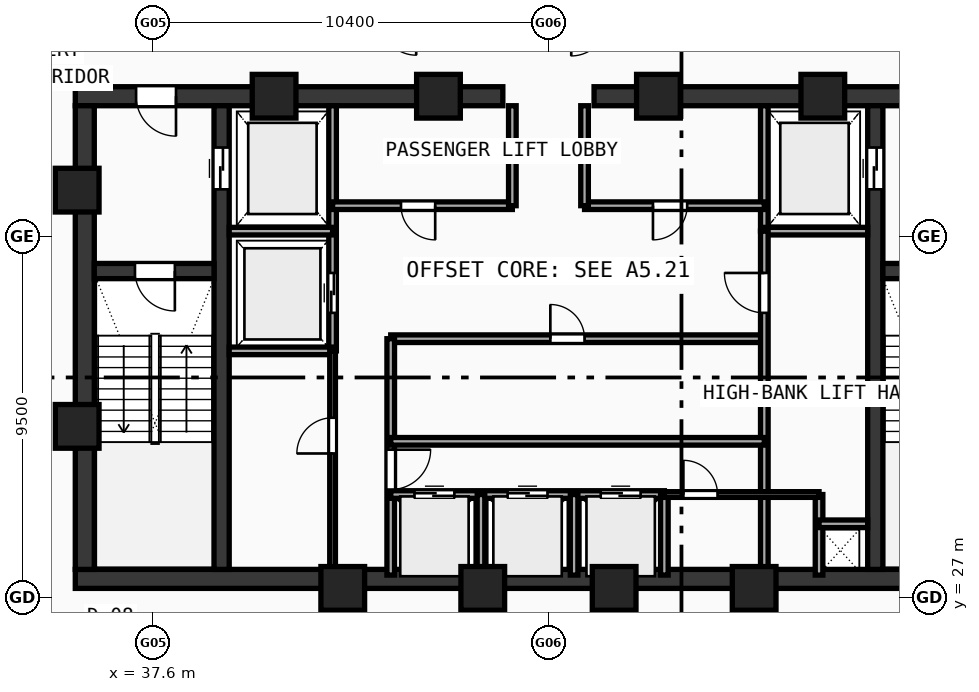
"""IFC4 building model, lengths in metres.
Left out: names, types, materials, properties, quantities, classifications, styles, units other than length and angle.
Written with IfcOpenShell. Run it as: python <this file> out.ifc"""

import sys

from ifc_helpers import new_model, si_unit, direction, frame, frame_2d, origin, origin_with_axes, origin_2d, place, context, subcontext, project, spatial, rectangle, hollow_rectangle, extrude, source, transform, mapped, element, fill, save


model = new_model("IFC4")
c1 = context("Model", 3, precision=1e-05, world=origin(), true_north=direction((0.0, 1.0)))
c2 = subcontext(c1, "Body", "Model", "MODEL_VIEW")
j1 = project(units=[si_unit("LENGTHUNIT", "METRE"), si_unit("PLANEANGLEUNIT", "RADIAN")], contexts=[c1])
p1 = place(None, origin())
s1 = spatial("IfcSite", under=j1, at=p1, CompositionType="ELEMENT")
p2 = place(p1, origin())
s2 = spatial("IfcBuilding", under=s1, at=p2, CompositionType="ELEMENT")
p3 = place(p2, frame((0.0, 0.0, 348.01)))
s3 = spatial("IfcBuildingStorey", under=s2, at=p3, CompositionType="ELEMENT", Elevation=348.01)
p4 = place(p3, frame((35.55, 27.5, 0.0), z_axis=(0.0, 0.0, 1.0), x_axis=(1.0, 0.0, 0.0)))
e1 = element("IfcWall", 1, at=p4, inside=s3, PredefinedType="SHEAR", context=c2, shape_type="SweptSolid", body=[
    extrude(rectangle(XDim=24.9, YDim=0.5, at=frame_2d((12.45, 0.0))), origin(), (0.0, 0.0, 1.0), 3.49),
])
p5 = place(p3, frame((35.55, 40.2, 0.0), z_axis=(0.0, 0.0, 1.0), x_axis=(1.0, 0.0, 0.0)))
e2 = element("IfcWall", 2, at=p5, inside=s3, PredefinedType="SHEAR", context=c2, shape_type="SweptSolid", body=[
    extrude(rectangle(XDim=11.25, YDim=0.5, at=frame_2d((5.625, 0.0))), origin(), (0.0, 0.0, 1.0), 3.49),
])
p6 = place(p5, frame((1.6, 0.0, 0.0)))
e3 = element("IfcOpeningElement", 3, at=p6, cuts=e2, PredefinedType="OPENING", context=c2, shape_type="SweptSolid", body=[
    extrude(rectangle(XDim=1.05, YDim=2.1, at=frame_2d((0.525, 1.05))), frame((0.0, 0.26, 0.0), z_axis=(0.0, -1.0, 0.0), x_axis=(1.0, 0.0, 0.0)), (0.0, 0.0, 1.0), 0.52),
])
p7 = place(p3, frame((49.2, 40.2, 0.0), z_axis=(0.0, 0.0, 1.0), x_axis=(1.0, 0.0, 0.0)))
e4 = element("IfcWall", 4, at=p7, inside=s3, PredefinedType="SHEAR", context=c2, shape_type="SweptSolid", body=[
    extrude(rectangle(XDim=11.25, YDim=0.5, at=frame_2d((5.625, 0.0))), origin(), (0.0, 0.0, 1.0), 3.49),
])
p8 = place(p7, frame((8.6, 0.0, 0.0)))
e5 = element("IfcOpeningElement", 5, at=p8, cuts=e4, PredefinedType="OPENING", context=c2, shape_type="SweptSolid", body=[
    extrude(rectangle(XDim=1.05, YDim=2.1, at=frame_2d((0.525, 1.05))), frame((0.0, 0.26, 0.0), z_axis=(0.0, -1.0, 0.0), x_axis=(1.0, 0.0, 0.0)), (0.0, 0.0, 1.0), 0.52),
])
p9 = place(p3, frame((35.8, 27.75, 0.0), z_axis=(0.0, 0.0, 1.0), x_axis=(0.0, 1.0, 0.0)))
e6 = element("IfcWall", 6, at=p9, inside=s3, PredefinedType="SHEAR", context=c2, shape_type="SweptSolid", body=[
    extrude(rectangle(XDim=12.2, YDim=0.5, at=frame_2d((6.1, 0.0))), origin(), (0.0, 0.0, 1.0), 3.49),
])
p10 = place(p3, frame((39.4, 27.75, 0.0), z_axis=(0.0, 0.0, 1.0), x_axis=(0.0, 1.0, 0.0)))
e7 = element("IfcWall", 7, at=p10, inside=s3, PredefinedType="SHEAR", context=c2, shape_type="SweptSolid", body=[
    extrude(rectangle(XDim=12.2, YDim=0.4, at=frame_2d((6.1, 0.0))), origin(), (0.0, 0.0, 1.0), 3.49),
])
p11 = place(p10, frame((10.0, 0.0, 0.0)))
e8 = element("IfcOpeningElement", 8, at=p11, cuts=e7, PredefinedType="OPENING", context=c2, shape_type="SweptSolid", body=[
    extrude(rectangle(XDim=1.1, YDim=2.1, at=frame_2d((0.55, 1.05))), frame((0.0, 0.21, 0.0), z_axis=(0.0, -1.0, 0.0), x_axis=(1.0, 0.0, 0.0)), (0.0, 0.0, 1.0), 0.42),
])
p12 = place(p3, frame((56.6, 27.75, 0.0), z_axis=(0.0, 0.0, 1.0), x_axis=(0.0, 1.0, 0.0)))
e9 = element("IfcWall", 9, at=p12, inside=s3, PredefinedType="SHEAR", context=c2, shape_type="SweptSolid", body=[
    extrude(rectangle(XDim=12.2, YDim=0.4, at=frame_2d((6.1, 0.0))), origin(), (0.0, 0.0, 1.0), 3.49),
])
p13 = place(p12, frame((10.0, 0.0, 0.0)))
e10 = element("IfcOpeningElement", 10, at=p13, cuts=e9, PredefinedType="OPENING", context=c2, shape_type="SweptSolid", body=[
    extrude(rectangle(XDim=1.1, YDim=2.1, at=frame_2d((0.55, 1.05))), frame((0.0, 0.21, 0.0), z_axis=(0.0, -1.0, 0.0), x_axis=(1.0, 0.0, 0.0)), (0.0, 0.0, 1.0), 0.42),
])
p14 = place(p3, frame((36.05, 35.6, 0.0), z_axis=(0.0, 0.0, 1.0), x_axis=(1.0, 0.0, 0.0)))
e11 = element("IfcWall", 11, at=p14, inside=s3, PredefinedType="SHEAR", context=c2, shape_type="SweptSolid", body=[
    extrude(rectangle(XDim=3.15, YDim=0.4, at=frame_2d((1.575, 0.0))), origin(), (0.0, 0.0, 1.0), 3.49),
])
p15 = place(p14, frame((1.07, 0.0, 0.0)))
e12 = element("IfcOpeningElement", 12, at=p15, cuts=e11, PredefinedType="OPENING", context=c2, shape_type="SweptSolid", body=[
    extrude(rectangle(XDim=1.05, YDim=2.1, at=frame_2d((0.525, 1.05))), frame((0.0, 0.21, 0.0), z_axis=(0.0, -1.0, 0.0), x_axis=(1.0, 0.0, 0.0)), (0.0, 0.0, 1.0), 0.42),
])
p16 = place(p3, frame((56.8, 35.6, 0.0), z_axis=(0.0, 0.0, 1.0), x_axis=(1.0, 0.0, 0.0)))
e13 = element("IfcWall", 13, at=p16, inside=s3, PredefinedType="SHEAR", context=c2, shape_type="SweptSolid", body=[
    extrude(rectangle(XDim=3.15, YDim=0.4, at=frame_2d((1.575, 0.0))), origin(), (0.0, 0.0, 1.0), 3.49),
])
p17 = place(p16, frame((1.02, 0.0, 0.0)))
e14 = element("IfcOpeningElement", 14, at=p17, cuts=e13, PredefinedType="OPENING", context=c2, shape_type="SweptSolid", body=[
    extrude(rectangle(XDim=1.05, YDim=2.1, at=frame_2d((0.525, 1.05))), frame((0.0, 0.21, 0.0), z_axis=(0.0, -1.0, 0.0), x_axis=(1.0, 0.0, 0.0)), (0.0, 0.0, 1.0), 0.42),
])
m1 = source(origin(), c2, "Body", "SweptSolid", [
    extrude(hollow_rectangle(XDim=1.15, YDim=1.15, WallThickness=0.048, at=origin_2d()), origin(), (0.0, 0.0, 1.0), 3.75),
])
for number, where, z_axis, x_axis in (
    (15, (42.588, 27.25, -0.26), (0.0, 0.0, 1.0), (1.0, 0.0, 0.0)),
    (16, (46.272, 27.25, -0.26), (0.0, 0.0, 1.0), (1.0, 0.0, 0.0)),
    (17, (49.729, 27.25, -0.26), (0.0, 0.0, 1.0), (1.0, 0.0, 0.0)),
    (18, (53.412, 27.25, -0.26), (0.0, 0.0, 1.0), (1.0, 0.0, 0.0)),
    (19, (55.219, 40.2, -0.26), (0.0, 0.0, 1.0), (1.0, 0.0, 0.0)),
    (20, (50.894, 40.2, -0.26), (0.0, 0.0, 1.0), (1.0, 0.0, 0.0)),
    (21, (45.106, 40.2, -0.26), (0.0, 0.0, 1.0), (1.0, 0.0, 0.0)),
    (22, (40.781, 40.2, -0.26), (0.0, 0.0, 1.0), (1.0, 0.0, 0.0)),
    (23, (35.6, 37.729, -0.26), (0.0, 0.0, 1.0), (1.0, 0.0, 0.0)),
    (24, (35.6, 31.513, -0.26), (0.0, 0.0, 1.0), (1.0, 0.0, 0.0)),
):
    element("IfcColumn", number, at=place(p3, frame(where, z_axis=z_axis, x_axis=x_axis)), inside=s3, PredefinedType="COLUMN", context=c2, shape_type="MappedRepresentation", body=[
        mapped(m1, transform((0.0, 0.0, 0.0), scale=1.0)),
    ])
p18 = place(p3, frame((42.32, 33.5, 0.0), z_axis=(0.0, 0.0, 1.0), x_axis=(0.0, 1.0, 0.0)))
e25 = element("IfcWall", 25, at=p18, inside=s3, PredefinedType="SOLIDWALL", context=c2, shape_type="SweptSolid", body=[
    extrude(rectangle(XDim=6.45, YDim=0.2, at=frame_2d((3.225, 0.0))), origin(), (0.0, 0.0, 1.0), 3.49),
])
p19 = place(p18, frame((1.0, 0.0, 0.0)))
e26 = element("IfcOpeningElement", 26, at=p19, cuts=e25, PredefinedType="OPENING", context=c2, shape_type="SweptSolid", body=[
    extrude(rectangle(XDim=1.05, YDim=2.1, at=frame_2d((0.525, 1.05))), frame((0.0, 0.11, 0.0), z_axis=(0.0, -1.0, 0.0), x_axis=(1.0, 0.0, 0.0)), (0.0, 0.0, 1.0), 0.22),
])
for number, where, z_axis, x_axis in (
    (27, (39.6, 36.65, 0.0), (0.0, 0.0, 1.0), (1.0, 0.0, 0.0)),
    (28, (39.6, 33.5, 0.0), (0.0, 0.0, 1.0), (1.0, 0.0, 0.0)),
):
    element("IfcWall", number, at=place(p3, frame(where, z_axis=z_axis, x_axis=x_axis)), inside=s3, PredefinedType="SOLIDWALL", context=c2, shape_type="SweptSolid", body=[
        extrude(rectangle(XDim=2.72, YDim=0.2, at=frame_2d((1.36, 0.0))), origin(), (0.0, 0.0, 1.0), 3.49),
    ])
p20 = place(p3, frame((53.68, 36.65, 0.0), z_axis=(0.0, 0.0, 1.0), x_axis=(0.0, 1.0, 0.0)))
e29 = element("IfcWall", 29, at=p20, inside=s3, PredefinedType="SOLIDWALL", context=c2, shape_type="SweptSolid", body=[
    extrude(rectangle(XDim=3.3, YDim=0.2, at=frame_2d((1.65, 0.0))), origin(), (0.0, 0.0, 1.0), 3.49),
])
p21 = place(p3, frame((53.68, 36.65, 0.0), z_axis=(0.0, 0.0, 1.0), x_axis=(1.0, 0.0, 0.0)))
e30 = element("IfcWall", 30, at=p21, inside=s3, PredefinedType="SOLIDWALL", context=c2, shape_type="SweptSolid", body=[
    extrude(rectangle(XDim=2.72, YDim=0.2, at=frame_2d((1.36, 0.0))), origin(), (0.0, 0.0, 1.0), 3.49),
])
p22 = place(p3, frame((42.32, 37.32, 0.0), z_axis=(0.0, 0.0, 1.0), x_axis=(1.0, 0.0, 0.0)))
e31 = element("IfcWall", 31, at=p22, inside=s3, PredefinedType="SOLIDWALL", context=c2, shape_type="SweptSolid", body=[
    extrude(rectangle(XDim=4.73, YDim=0.2, at=frame_2d((2.365, 0.0))), origin(), (0.0, 0.0, 1.0), 3.49),
])
p23 = place(p22, frame((1.8, 0.0, 0.0)))
e32 = element("IfcOpeningElement", 32, at=p23, cuts=e31, PredefinedType="OPENING", context=c2, shape_type="SweptSolid", body=[
    extrude(rectangle(XDim=0.9, YDim=2.1, at=frame_2d((0.45, 1.05))), frame((0.0, 0.11, 0.0), z_axis=(0.0, -1.0, 0.0), x_axis=(1.0, 0.0, 0.0)), (0.0, 0.0, 1.0), 0.22),
])
p24 = place(p3, frame((48.95, 37.32, 0.0), z_axis=(0.0, 0.0, 1.0), x_axis=(1.0, 0.0, 0.0)))
e33 = element("IfcWall", 33, at=p24, inside=s3, PredefinedType="SOLIDWALL", context=c2, shape_type="SweptSolid", body=[
    extrude(rectangle(XDim=4.73, YDim=0.2, at=frame_2d((2.365, 0.0))), origin(), (0.0, 0.0, 1.0), 3.49),
])
p25 = place(p24, frame((1.8, 0.0, 0.0)))
e34 = element("IfcOpeningElement", 34, at=p25, cuts=e33, PredefinedType="OPENING", context=c2, shape_type="SweptSolid", body=[
    extrude(rectangle(XDim=0.9, YDim=2.1, at=frame_2d((0.45, 1.05))), frame((0.0, 0.11, 0.0), z_axis=(0.0, -1.0, 0.0), x_axis=(1.0, 0.0, 0.0)), (0.0, 0.0, 1.0), 0.22),
])
for number, where, z_axis, x_axis in (
    (35, (47.05, 37.32, 0.0), (0.0, 0.0, 1.0), (0.0, 1.0, 0.0)),
    (36, (48.95, 37.32, 0.0), (0.0, 0.0, 1.0), (0.0, 1.0, 0.0)),
):
    element("IfcWall", number, at=place(p3, frame(where, z_axis=z_axis, x_axis=x_axis)), inside=s3, PredefinedType="SOLIDWALL", context=c2, shape_type="SweptSolid", body=[
        extrude(rectangle(XDim=2.63, YDim=0.2, at=frame_2d((1.315, 0.0))), origin(), (0.0, 0.0, 1.0), 3.49),
    ])
p26 = place(p3, frame((43.85, 33.82, 0.0), z_axis=(0.0, 0.0, 1.0), x_axis=(1.0, 0.0, 0.0)))
e37 = element("IfcWall", 37, at=p26, inside=s3, PredefinedType="SOLIDWALL", context=c2, shape_type="SweptSolid", body=[
    extrude(rectangle(XDim=9.83, YDim=0.2, at=frame_2d((4.915, 0.0))), origin(), (0.0, 0.0, 1.0), 3.49),
])
p27 = place(p26, frame((4.2, 0.0, 0.0)))
e38 = element("IfcOpeningElement", 38, at=p27, cuts=e37, PredefinedType="OPENING", context=c2, shape_type="SweptSolid", body=[
    extrude(rectangle(XDim=0.9, YDim=2.1, at=frame_2d((0.45, 1.05))), frame((0.0, 0.11, 0.0), z_axis=(0.0, -1.0, 0.0), x_axis=(1.0, 0.0, 0.0)), (0.0, 0.0, 1.0), 0.22),
])
p28 = place(p3, frame((43.85, 27.6, 0.0), z_axis=(0.0, 0.0, 1.0), x_axis=(0.0, 1.0, 0.0)))
e39 = element("IfcWall", 39, at=p28, inside=s3, PredefinedType="SOLIDWALL", context=c2, shape_type="SweptSolid", body=[
    extrude(rectangle(XDim=6.22, YDim=0.2, at=frame_2d((3.11, 0.0))), origin(), (0.0, 0.0, 1.0), 3.49),
])
p29 = place(p28, frame((2.25, 0.0, 0.0)))
e40 = element("IfcOpeningElement", 40, at=p29, cuts=e39, PredefinedType="OPENING", context=c2, shape_type="SweptSolid", body=[
    extrude(rectangle(XDim=1.05, YDim=2.1, at=frame_2d((0.525, 1.05))), frame((0.0, 0.11, 0.0), z_axis=(0.0, -1.0, 0.0), x_axis=(1.0, 0.0, 0.0)), (0.0, 0.0, 1.0), 0.22),
])
p30 = place(p3, frame((53.68, 27.6, 0.0), z_axis=(0.0, 0.0, 1.0), x_axis=(0.0, 1.0, 0.0)))
e41 = element("IfcWall", 41, at=p30, inside=s3, PredefinedType="SOLIDWALL", context=c2, shape_type="SweptSolid", body=[
    extrude(rectangle(XDim=9.05, YDim=0.2, at=frame_2d((4.525, 0.0))), origin(), (0.0, 0.0, 1.0), 3.49),
])
p31 = place(p30, frame((6.9, 0.0, 0.0)))
e42 = element("IfcOpeningElement", 42, at=p31, cuts=e41, PredefinedType="OPENING", context=c2, shape_type="SweptSolid", body=[
    extrude(rectangle(XDim=1.05, YDim=2.1, at=frame_2d((0.525, 1.05))), frame((0.0, 0.11, 0.0), z_axis=(0.0, -1.0, 0.0), x_axis=(1.0, 0.0, 0.0)), (0.0, 0.0, 1.0), 0.22),
])
p32 = place(p3, frame((43.85, 29.72, 0.0), z_axis=(0.0, 0.0, 1.0), x_axis=(1.0, 0.0, 0.0)))
e43 = element("IfcWall", 43, at=p32, inside=s3, PredefinedType="SOLIDWALL", context=c2, shape_type="SweptSolid", body=[
    extrude(rectangle(XDim=7.2, YDim=0.2, at=frame_2d((3.6, 0.0))), origin(), (0.0, 0.0, 1.0), 3.49),
])
p33 = place(p32, frame((0.625, 0.0, 0.0)))
e44 = element("IfcOpeningElement", 44, at=p33, cuts=e43, PredefinedType="OPENING", context=c2, shape_type="SweptSolid", body=[
    extrude(rectangle(XDim=1.05, YDim=2.1, at=frame_2d((0.525, 1.05))), frame((0.0, 0.11, 0.0), z_axis=(0.0, -1.0, 0.0), x_axis=(1.0, 0.0, 0.0)), (0.0, 0.0, 1.0), 0.22),
])
p34 = place(p32, frame((3.075, 0.0, 0.0)))
e45 = element("IfcOpeningElement", 45, at=p34, cuts=e43, PredefinedType="OPENING", context=c2, shape_type="SweptSolid", body=[
    extrude(rectangle(XDim=1.05, YDim=2.1, at=frame_2d((0.525, 1.05))), frame((0.0, 0.11, 0.0), z_axis=(0.0, -1.0, 0.0), x_axis=(1.0, 0.0, 0.0)), (0.0, 0.0, 1.0), 0.22),
])
p35 = place(p32, frame((5.525, 0.0, 0.0)))
e46 = element("IfcOpeningElement", 46, at=p35, cuts=e43, PredefinedType="OPENING", context=c2, shape_type="SweptSolid", body=[
    extrude(rectangle(XDim=1.05, YDim=2.1, at=frame_2d((0.525, 1.05))), frame((0.0, 0.11, 0.0), z_axis=(0.0, -1.0, 0.0), x_axis=(1.0, 0.0, 0.0)), (0.0, 0.0, 1.0), 0.22),
])
p36 = place(p3, frame((51.05, 27.6, 0.0), z_axis=(0.0, 0.0, 1.0), x_axis=(0.0, 1.0, 0.0)))
e47 = element("IfcWall", 47, at=p36, inside=s3, PredefinedType="SOLIDWALL", context=c2, shape_type="SweptSolid", body=[
    extrude(rectangle(XDim=2.12, YDim=0.2, at=frame_2d((1.06, 0.0))), origin(), (0.0, 0.0, 1.0), 3.49),
])
p37 = place(p3, frame((43.85, 31.12, 0.0), z_axis=(0.0, 0.0, 1.0), x_axis=(1.0, 0.0, 0.0)))
e48 = element("IfcWall", 48, at=p37, inside=s3, PredefinedType="SOLIDWALL", context=c2, shape_type="SweptSolid", body=[
    extrude(rectangle(XDim=9.83, YDim=0.2, at=frame_2d((4.915, 0.0))), origin(), (0.0, 0.0, 1.0), 3.49),
])
for number, where, z_axis, x_axis in (
    (49, (46.225, 27.6, 0.0), (0.0, 0.0, 1.0), (0.0, 1.0, 0.0)),
    (50, (48.675, 27.6, 0.0), (0.0, 0.0, 1.0), (0.0, 1.0, 0.0)),
    (51, (55.12, 27.6, 0.0), (0.0, 0.0, 1.0), (0.0, 1.0, 0.0)),
):
    element("IfcWall", number, at=place(p3, frame(where, z_axis=z_axis, x_axis=x_axis)), inside=s3, PredefinedType="SOLIDWALL", context=c2, shape_type="SweptSolid", body=[
        extrude(rectangle(XDim=2.12, YDim=0.2, at=frame_2d((1.06, 0.0))), origin(), (0.0, 0.0, 1.0), 3.49),
    ])
p38 = place(p3, frame((55.12, 28.95, 0.0), z_axis=(0.0, 0.0, 1.0), x_axis=(1.0, 0.0, 0.0)))
e52 = element("IfcWall", 52, at=p38, inside=s3, PredefinedType="SOLIDWALL", context=c2, shape_type="SweptSolid", body=[
    extrude(rectangle(XDim=1.28, YDim=0.2, at=frame_2d((0.64, 0.0))), origin(), (0.0, 0.0, 1.0), 3.49),
])
p39 = place(p3, frame((42.32, 27.6, 0.0), z_axis=(0.0, 0.0, 1.0), x_axis=(0.0, 1.0, 0.0)))
e53 = element("IfcWall", 53, at=p39, inside=s3, PredefinedType="PARTITIONING", context=c2, shape_type="SweptSolid", body=[
    extrude(rectangle(XDim=5.9, YDim=0.15, at=frame_2d((2.95, 0.0))), origin(), (0.0, 0.0, 1.0), 3.49),
])
p40 = place(p39, frame((3.2, 0.0, 0.0)))
e54 = element("IfcOpeningElement", 54, at=p40, cuts=e53, PredefinedType="OPENING", context=c2, shape_type="SweptSolid", body=[
    extrude(rectangle(XDim=0.94, YDim=2.1, at=frame_2d((0.47, 1.05))), frame((0.0, 0.085, 0.0), z_axis=(0.0, -1.0, 0.0), x_axis=(1.0, 0.0, 0.0)), (0.0, 0.0, 1.0), 0.17),
])
p41 = place(p3, frame((51.05, 29.72, 0.0), z_axis=(0.0, 0.0, 1.0), x_axis=(1.0, 0.0, 0.0)))
e55 = element("IfcWall", 55, at=p41, inside=s3, PredefinedType="PARTITIONING", context=c2, shape_type="SweptSolid", body=[
    extrude(rectangle(XDim=4.07, YDim=0.15, at=frame_2d((2.035, 0.0))), origin(), (0.0, 0.0, 1.0), 3.49),
])
p42 = place(p41, frame((0.5, 0.0, 0.0)))
e56 = element("IfcOpeningElement", 56, at=p42, cuts=e55, PredefinedType="OPENING", context=c2, shape_type="SweptSolid", body=[
    extrude(rectangle(XDim=0.9, YDim=2.1, at=frame_2d((0.45, 1.05))), frame((0.0, 0.085, 0.0), z_axis=(0.0, -1.0, 0.0), x_axis=(1.0, 0.0, 0.0)), (0.0, 0.0, 1.0), 0.17),
])
m2 = source(origin(), c2, "Body", "SweptSolid", [
    extrude(rectangle(XDim=1.05, YDim=2.1, at=frame_2d((0.525, 1.05))), frame((0.0, 0.025, 0.0), z_axis=(0.0, -1.0, 0.0), x_axis=(1.0, 0.0, 0.0)), (0.0, 0.0, 1.0), 0.05),
])
p43 = place(p15, frame((1.05, 0.0, 0.0), z_axis=(0.0, 0.0, 1.0), x_axis=(-1.0, 0.0, 0.0)))
e57 = element("IfcDoor", 57, at=p43, inside=s3, OperationType="SINGLE_SWING_LEFT", PredefinedType="DOOR", context=c2, shape_type="MappedRepresentation", body=[
    mapped(m2, transform((0.0, 0.0, 0.0), scale=1.0)),
])
fill(e12, e57)
p44 = place(p6, frame((1.05, 0.0, 0.0), z_axis=(0.0, 0.0, 1.0), x_axis=(-1.0, 0.0, 0.0)))
e58 = element("IfcDoor", 58, at=p44, inside=s3, OperationType="SINGLE_SWING_LEFT", PredefinedType="DOOR", context=c2, shape_type="MappedRepresentation", body=[
    mapped(m2, transform((0.0, 0.0, 0.0), scale=1.0)),
])
fill(e3, e58)
m3 = source(origin(), c2, "Body", "SweptSolid", [
    extrude(rectangle(XDim=1.1, YDim=2.1, at=frame_2d((0.55, 1.05))), frame((0.0, 0.025, 0.0), z_axis=(0.0, -1.0, 0.0), x_axis=(1.0, 0.0, 0.0)), (0.0, 0.0, 1.0), 0.05),
])
p45 = place(p11, frame((1.1, 0.0, 0.0), z_axis=(0.0, 0.0, 1.0), x_axis=(-1.0, 0.0, 0.0)))
e59 = element("IfcDoor", 59, at=p45, inside=s3, OperationType="DOUBLE_DOOR_SLIDING", PredefinedType="DOOR", context=c2, shape_type="MappedRepresentation", body=[
    mapped(m3, transform((0.0, 0.0, 0.0), scale=1.0)),
])
fill(e8, e59)
p46 = place(p13, origin_with_axes())
e60 = element("IfcDoor", 60, at=p46, inside=s3, OperationType="DOUBLE_DOOR_SLIDING", PredefinedType="DOOR", context=c2, shape_type="MappedRepresentation", body=[
    mapped(m3, transform((0.0, 0.0, 0.0), scale=1.0)),
])
fill(e10, e60)
p47 = place(p19, origin_with_axes())
e61 = element("IfcDoor", 61, at=p47, inside=s3, OperationType="DOUBLE_DOOR_SLIDING", PredefinedType="DOOR", context=c2, shape_type="MappedRepresentation", body=[
    mapped(m2, transform((0.0, 0.0, 0.0), scale=1.0)),
])
fill(e26, e61)
m4 = source(origin(), c2, "Body", "SweptSolid", [
    extrude(rectangle(XDim=0.9, YDim=2.1, at=frame_2d((0.45, 1.05))), frame((0.0, 0.025, 0.0), z_axis=(0.0, -1.0, 0.0), x_axis=(1.0, 0.0, 0.0)), (0.0, 0.0, 1.0), 0.05),
])
p48 = place(p23, frame((0.9, 0.0, 0.0), z_axis=(0.0, 0.0, 1.0), x_axis=(-1.0, 0.0, 0.0)))
e62 = element("IfcDoor", 62, at=p48, inside=s3, OperationType="SINGLE_SWING_LEFT", PredefinedType="DOOR", context=c2, shape_type="MappedRepresentation", body=[
    mapped(m4, transform((0.0, 0.0, 0.0), scale=1.0)),
])
fill(e32, e62)
p49 = place(p25, frame((0.9, 0.0, 0.0), z_axis=(0.0, 0.0, 1.0), x_axis=(-1.0, 0.0, 0.0)))
e63 = element("IfcDoor", 63, at=p49, inside=s3, OperationType="SINGLE_SWING_RIGHT", PredefinedType="DOOR", context=c2, shape_type="MappedRepresentation", body=[
    mapped(m4, transform((0.0, 0.0, 0.0), scale=1.0)),
])
fill(e34, e63)
p50 = place(p27, origin_with_axes())
e64 = element("IfcDoor", 64, at=p50, inside=s3, OperationType="SINGLE_SWING_LEFT", PredefinedType="DOOR", context=c2, shape_type="MappedRepresentation", body=[
    mapped(m4, transform((0.0, 0.0, 0.0), scale=1.0)),
])
fill(e38, e64)
p51 = place(p29, frame((1.05, 0.0, 0.0), z_axis=(0.0, 0.0, 1.0), x_axis=(-1.0, 0.0, 0.0)))
e65 = element("IfcDoor", 65, at=p51, inside=s3, OperationType="SINGLE_SWING_LEFT", PredefinedType="DOOR", context=c2, shape_type="MappedRepresentation", body=[
    mapped(m2, transform((0.0, 0.0, 0.0), scale=1.0)),
])
fill(e40, e65)
p52 = place(p31, origin_with_axes())
e66 = element("IfcDoor", 66, at=p52, inside=s3, OperationType="SINGLE_SWING_RIGHT", PredefinedType="DOOR", context=c2, shape_type="MappedRepresentation", body=[
    mapped(m2, transform((0.0, 0.0, 0.0), scale=1.0)),
])
fill(e42, e66)
p53 = place(p33, origin_with_axes())
e67 = element("IfcDoor", 67, at=p53, inside=s3, OperationType="DOUBLE_DOOR_SLIDING", PredefinedType="DOOR", context=c2, shape_type="MappedRepresentation", body=[
    mapped(m2, transform((0.0, 0.0, 0.0), scale=1.0)),
])
fill(e44, e67)
p54 = place(p34, origin_with_axes())
e68 = element("IfcDoor", 68, at=p54, inside=s3, OperationType="DOUBLE_DOOR_SLIDING", PredefinedType="DOOR", context=c2, shape_type="MappedRepresentation", body=[
    mapped(m2, transform((0.0, 0.0, 0.0), scale=1.0)),
])
fill(e45, e68)
p55 = place(p35, origin_with_axes())
e69 = element("IfcDoor", 69, at=p55, inside=s3, OperationType="DOUBLE_DOOR_SLIDING", PredefinedType="DOOR", context=c2, shape_type="MappedRepresentation", body=[
    mapped(m2, transform((0.0, 0.0, 0.0), scale=1.0)),
])
fill(e46, e69)
m5 = source(origin(), c2, "Body", "SweptSolid", [
    extrude(rectangle(XDim=0.94, YDim=2.1, at=frame_2d((0.47, 1.05))), frame((0.0, 0.025, 0.0), z_axis=(0.0, -1.0, 0.0), x_axis=(1.0, 0.0, 0.0)), (0.0, 0.0, 1.0), 0.05),
])
p56 = place(p40, origin_with_axes())
e70 = element("IfcDoor", 70, at=p56, inside=s3, OperationType="SINGLE_SWING_LEFT", PredefinedType="DOOR", context=c2, shape_type="MappedRepresentation", body=[
    mapped(m5, transform((0.0, 0.0, 0.0), scale=1.0)),
])
fill(e54, e70)
p57 = place(p42, origin_with_axes())
e71 = element("IfcDoor", 71, at=p57, inside=s3, OperationType="SINGLE_SWING_LEFT", PredefinedType="DOOR", context=c2, shape_type="MappedRepresentation", body=[
    mapped(m4, transform((0.0, 0.0, 0.0), scale=1.0)),
])
fill(e56, e71)
save(model, sys.argv[1])
